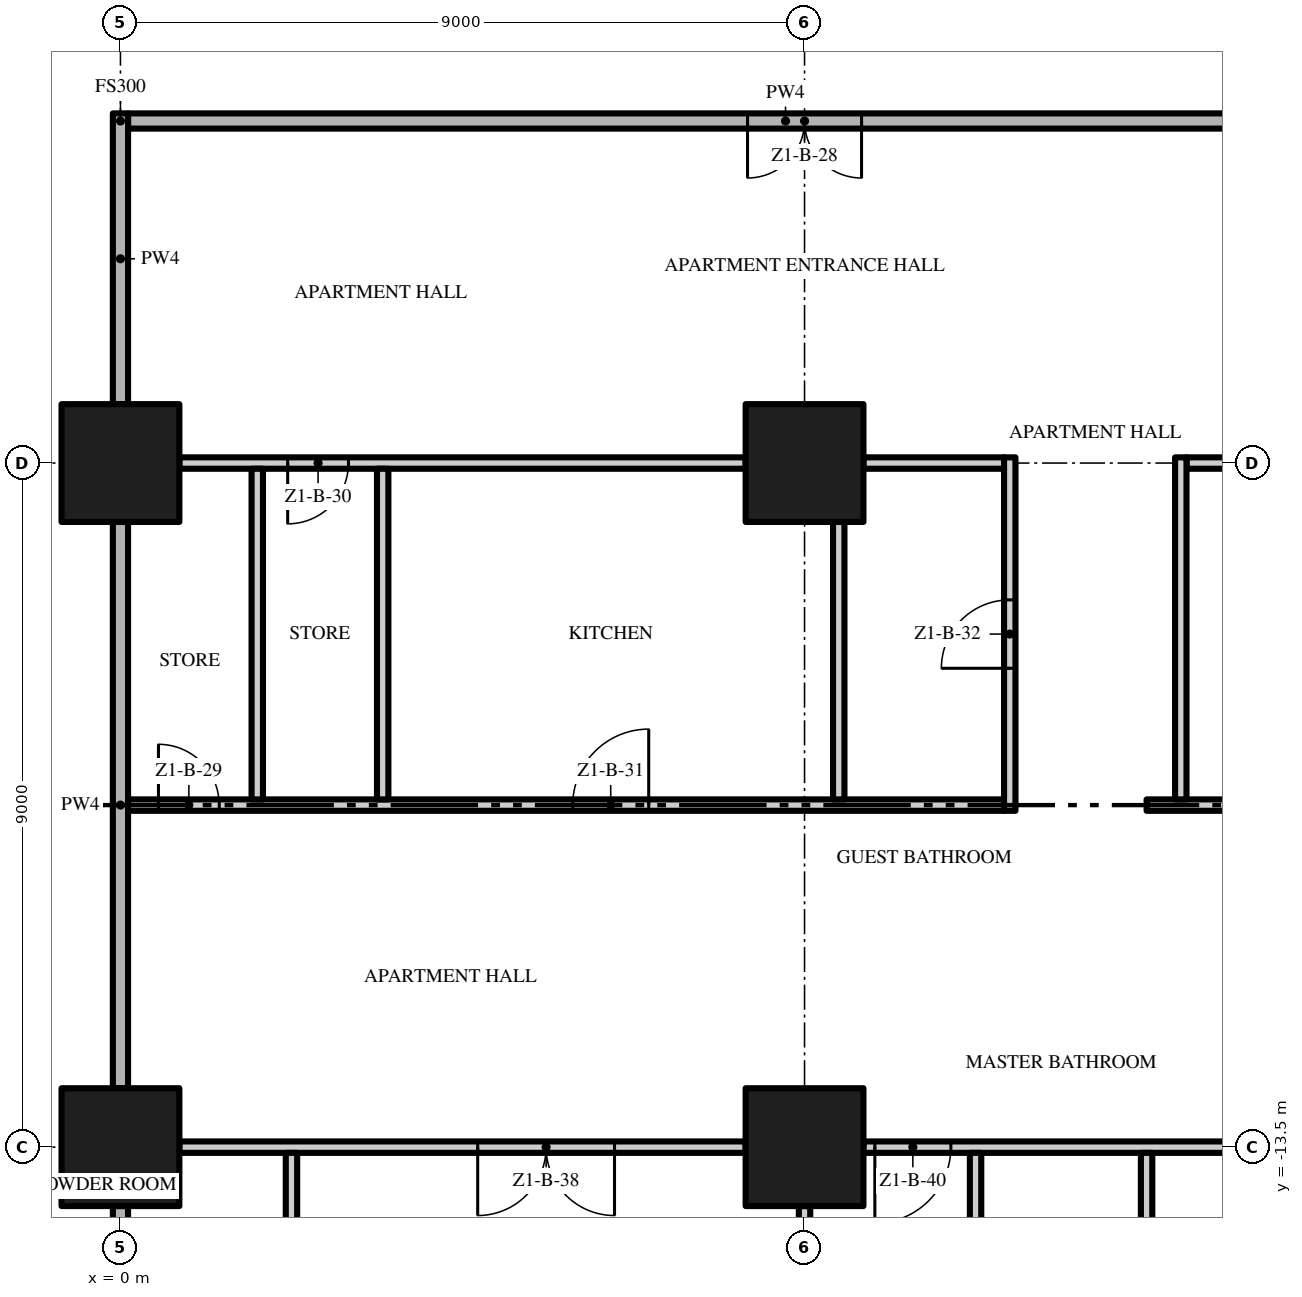
"""IFC4 building model, lengths in metres.
Left out: names, types, materials, properties, quantities, classifications, styles, units other than length and angle.
Written with IfcOpenShell. Run it as: python <this file> out.ifc"""

import sys

from ifc_helpers import new_model, si_unit, direction, frame, frame_2d, origin, origin_2d, place, context, subcontext, project, spatial, rectangle, extrude, element, fill, save


model = new_model("IFC4")
c1 = context("Model", 3, precision=1e-05, world=origin(), true_north=direction((0.0, 1.0)))
c2 = subcontext(c1, "Body", "Model", "MODEL_VIEW")
j1 = project(units=[si_unit("LENGTHUNIT", "METRE"), si_unit("PLANEANGLEUNIT", "RADIAN")], contexts=[c1])
p1 = place(None, origin())
s1 = spatial("IfcSite", under=j1, at=p1, CompositionType="ELEMENT")
p2 = place(p1, origin())
s2 = spatial("IfcBuilding", under=s1, at=p2, CompositionType="ELEMENT")
p3 = place(p2, frame((0.0, 0.0, 30.2)))
s3 = spatial("IfcBuildingStorey", under=s2, at=p3, CompositionType="ELEMENT", Elevation=30.2)
for number, where, z_axis, x_axis in (
    (1, (0.0, -13.5, 0.0), (0.0, 0.0, 1.0), (1.0, 0.0, 0.0)),
    (2, (0.0, -4.5, 0.0), (0.0, 0.0, 1.0), (1.0, 0.0, 0.0)),
    (3, (9.0, -13.5, 0.0), (0.0, 0.0, 1.0), (1.0, 0.0, 0.0)),
    (4, (9.0, -4.5, 0.0), (0.0, 0.0, 1.0), (1.0, 0.0, 0.0)),
):
    element("IfcColumn", number, at=place(p3, frame(where, z_axis=z_axis, x_axis=x_axis)), inside=s3, PredefinedType="COLUMN", context=c2, shape_type="SweptSolid", body=[
        extrude(rectangle(XDim=1.55, YDim=1.55, at=origin_2d()), origin(), (0.0, 0.0, 1.0), 3.5),
    ])
p4 = place(p3, frame((8.225, -13.5, 0.0), z_axis=(0.0, 0.0, 1.0), x_axis=(-1.0, 0.0, 0.0)))
e5 = element("IfcWall", 5, at=p4, inside=s3, PredefinedType="PARTITIONING", context=c2, shape_type="SweptSolid", body=[
    extrude(rectangle(XDim=7.45, YDim=0.15, at=frame_2d((3.725, 0.0))), origin(), (0.0, 0.0, 1.0), 3.5),
])
p5 = place(p4, frame((1.725, 0.0, 0.0)))
e6 = element("IfcOpeningElement", 6, at=p5, cuts=e5, PredefinedType="OPENING", context=c2, shape_type="SweptSolid", body=[
    extrude(rectangle(XDim=1.8, YDim=2.4, at=frame_2d((0.9, 1.2))), frame((0.0, 0.085, 0.0), z_axis=(0.0, -1.0, 0.0), x_axis=(1.0, 0.0, 0.0)), (0.0, 0.0, 1.0), 0.17),
])
p6 = place(p3, frame((17.225, -13.5, 0.0), z_axis=(0.0, 0.0, 1.0), x_axis=(-1.0, 0.0, 0.0)))
e7 = element("IfcWall", 7, at=p6, inside=s3, PredefinedType="PARTITIONING", context=c2, shape_type="SweptSolid", body=[
    extrude(rectangle(XDim=7.45, YDim=0.15, at=frame_2d((3.725, 0.0))), origin(), (0.0, 0.0, 1.0), 3.5),
])
p7 = place(p6, frame((6.3, 0.0, 0.0)))
e8 = element("IfcOpeningElement", 8, at=p7, cuts=e7, PredefinedType="OPENING", context=c2, shape_type="SweptSolid", body=[
    extrude(rectangle(XDim=1.0, YDim=2.4, at=frame_2d((0.5, 1.2))), frame((0.0, 0.085, 0.0), z_axis=(0.0, -1.0, 0.0), x_axis=(1.0, 0.0, 0.0)), (0.0, 0.0, 1.0), 0.17),
])
p8 = place(p6, frame((0.15, 0.0, 0.0)))
e9 = element("IfcOpeningElement", 9, at=p8, cuts=e7, PredefinedType="OPENING", context=c2, shape_type="SweptSolid", body=[
    extrude(rectangle(XDim=1.0, YDim=2.4, at=frame_2d((0.5, 1.2))), frame((0.0, 0.085, 0.0), z_axis=(0.0, -1.0, 0.0), x_axis=(1.0, 0.0, 0.0)), (0.0, 0.0, 1.0), 0.17),
])
p9 = place(p3, frame((0.1, -9.0, 0.0), z_axis=(0.0, 0.0, 1.0), x_axis=(1.0, 0.0, 0.0)))
e10 = element("IfcWall", 10, at=p9, inside=s3, PredefinedType="PARTITIONING", context=c2, shape_type="SweptSolid", body=[
    extrude(rectangle(XDim=11.525, YDim=0.15, at=frame_2d((5.763, 0.0))), origin(), (0.0, 0.0, 1.0), 3.5),
])
p10 = place(p9, frame((0.4, 0.0, 0.0)))
e11 = element("IfcOpeningElement", 11, at=p10, cuts=e10, PredefinedType="OPENING", context=c2, shape_type="SweptSolid", body=[
    extrude(rectangle(XDim=0.8, YDim=2.0, at=frame_2d((0.4, 1.0))), frame((0.0, 0.085, 0.0), z_axis=(0.0, -1.0, 0.0), x_axis=(1.0, 0.0, 0.0)), (0.0, 0.0, 1.0), 0.17),
])
p11 = place(p9, frame((5.85, 0.0, 0.0)))
e12 = element("IfcOpeningElement", 12, at=p11, cuts=e10, PredefinedType="OPENING", context=c2, shape_type="SweptSolid", body=[
    extrude(rectangle(XDim=1.0, YDim=2.4, at=frame_2d((0.5, 1.2))), frame((0.0, 0.085, 0.0), z_axis=(0.0, -1.0, 0.0), x_axis=(1.0, 0.0, 0.0)), (0.0, 0.0, 1.0), 0.17),
])
p12 = place(p3, frame((13.5, -9.0, 0.0), z_axis=(0.0, 0.0, 1.0), x_axis=(1.0, 0.0, 0.0)))
e13 = element("IfcWall", 13, at=p12, inside=s3, PredefinedType="PARTITIONING", context=c2, shape_type="SweptSolid", body=[
    extrude(rectangle(XDim=13.2, YDim=0.15, at=frame_2d((6.6, 0.0))), origin(), (0.0, 0.0, 1.0), 3.5),
])
p13 = place(p12, frame((4.0, 0.0, 0.0)))
e14 = element("IfcOpeningElement", 14, at=p13, cuts=e13, PredefinedType="OPENING", context=c2, shape_type="SweptSolid", body=[
    extrude(rectangle(XDim=0.8, YDim=2.0, at=frame_2d((0.4, 1.0))), frame((0.0, 0.085, 0.0), z_axis=(0.0, -1.0, 0.0), x_axis=(1.0, 0.0, 0.0)), (0.0, 0.0, 1.0), 0.17),
])
p14 = place(p12, frame((12.2, 0.0, 0.0)))
e15 = element("IfcOpeningElement", 15, at=p14, cuts=e13, PredefinedType="OPENING", context=c2, shape_type="SweptSolid", body=[
    extrude(rectangle(XDim=0.8, YDim=2.0, at=frame_2d((0.4, 1.0))), frame((0.0, 0.085, 0.0), z_axis=(0.0, -1.0, 0.0), x_axis=(1.0, 0.0, 0.0)), (0.0, 0.0, 1.0), 0.17),
])
p15 = place(p3, frame((8.225, -4.5, 0.0), z_axis=(0.0, 0.0, 1.0), x_axis=(-1.0, 0.0, 0.0)))
e16 = element("IfcWall", 16, at=p15, inside=s3, PredefinedType="PARTITIONING", context=c2, shape_type="SweptSolid", body=[
    extrude(rectangle(XDim=7.45, YDim=0.15, at=frame_2d((3.725, 0.0))), origin(), (0.0, 0.0, 1.0), 3.5),
])
p16 = place(p15, frame((5.225, 0.0, 0.0)))
e17 = element("IfcOpeningElement", 17, at=p16, cuts=e16, PredefinedType="OPENING", context=c2, shape_type="SweptSolid", body=[
    extrude(rectangle(XDim=0.8, YDim=2.0, at=frame_2d((0.4, 1.0))), frame((0.0, 0.085, 0.0), z_axis=(0.0, -1.0, 0.0), x_axis=(1.0, 0.0, 0.0)), (0.0, 0.0, 1.0), 0.17),
])
p17 = place(p3, frame((9.775, -4.5, 0.0), z_axis=(0.0, 0.0, 1.0), x_axis=(1.0, 0.0, 0.0)))
e18 = element("IfcWall", 18, at=p17, inside=s3, PredefinedType="PARTITIONING", context=c2, shape_type="SweptSolid", body=[
    extrude(rectangle(XDim=1.85, YDim=0.15, at=frame_2d((0.925, 0.0))), origin(), (0.0, 0.0, 1.0), 3.5),
])
p18 = place(p3, frame((17.225, -4.5, 0.0), z_axis=(0.0, 0.0, 1.0), x_axis=(-1.0, 0.0, 0.0)))
e19 = element("IfcWall", 19, at=p18, inside=s3, PredefinedType="PARTITIONING", context=c2, shape_type="SweptSolid", body=[
    extrude(rectangle(XDim=3.2, YDim=0.15, at=frame_2d((1.6, 0.0))), origin(), (0.0, 0.0, 1.0), 3.5),
])
p19 = place(p18, frame((1.55, 0.0, 0.0)))
e20 = element("IfcOpeningElement", 20, at=p19, cuts=e19, PredefinedType="OPENING", context=c2, shape_type="SweptSolid", body=[
    extrude(rectangle(XDim=0.8, YDim=2.0, at=frame_2d((0.4, 1.0))), frame((0.0, 0.085, 0.0), z_axis=(0.0, -1.0, 0.0), x_axis=(1.0, 0.0, 0.0)), (0.0, 0.0, 1.0), 0.17),
])
p20 = place(p3, frame((17.4, 0.0, 0.0), z_axis=(0.0, 0.0, 1.0), x_axis=(-1.0, 0.0, 0.0)))
e21 = element("IfcWall", 21, at=p20, inside=s3, PredefinedType="PARTITIONING", context=c2, shape_type="SweptSolid", body=[
    extrude(rectangle(XDim=17.3, YDim=0.2, at=frame_2d((8.65, 0.0))), origin(), (0.0, 0.0, 1.0), 3.5),
])
p21 = place(p20, frame((7.65, 0.0, 0.0)))
e22 = element("IfcOpeningElement", 22, at=p21, cuts=e21, PredefinedType="OPENING", context=c2, shape_type="SweptSolid", body=[
    extrude(rectangle(XDim=1.5, YDim=2.4, at=frame_2d((0.75, 1.2))), frame((0.0, 0.11, 0.0), z_axis=(0.0, -1.0, 0.0), x_axis=(1.0, 0.0, 0.0)), (0.0, 0.0, 1.0), 0.22),
])
p22 = place(p3, frame((0.0, -21.05, 0.0), z_axis=(0.0, 0.0, 1.0), x_axis=(0.0, 1.0, 0.0)))
e23 = element("IfcWall", 23, at=p22, inside=s3, PredefinedType="PARTITIONING", context=c2, shape_type="SweptSolid", body=[
    extrude(rectangle(XDim=6.775, YDim=0.2, at=frame_2d((3.388, 0.0))), origin(), (0.0, 0.0, 1.0), 3.5),
])
p23 = place(p3, frame((0.0, -12.725, 0.0), z_axis=(0.0, 0.0, 1.0), x_axis=(0.0, 1.0, 0.0)))
e24 = element("IfcWall", 24, at=p23, inside=s3, PredefinedType="PARTITIONING", context=c2, shape_type="SweptSolid", body=[
    extrude(rectangle(XDim=7.45, YDim=0.2, at=frame_2d((3.725, 0.0))), origin(), (0.0, 0.0, 1.0), 3.5),
])
p24 = place(p3, frame((0.0, -3.725, 0.0), z_axis=(0.0, 0.0, 1.0), x_axis=(0.0, 1.0, 0.0)))
e25 = element("IfcWall", 25, at=p24, inside=s3, PredefinedType="PARTITIONING", context=c2, shape_type="SweptSolid", body=[
    extrude(rectangle(XDim=3.825, YDim=0.2, at=frame_2d((1.913, 0.0))), origin(), (0.0, 0.0, 1.0), 3.5),
])
p25 = place(p3, frame((1.8, -8.925, 0.0), z_axis=(0.0, 0.0, 1.0), x_axis=(0.0, 1.0, 0.0)))
e26 = element("IfcWall", 26, at=p25, inside=s3, PredefinedType="PARTITIONING", context=c2, shape_type="SweptSolid", body=[
    extrude(rectangle(XDim=4.35, YDim=0.15, at=frame_2d((2.175, 0.0))), origin(), (0.0, 0.0, 1.0), 3.5),
])
p26 = place(p3, frame((2.25, -16.575, 0.0), z_axis=(0.0, 0.0, 1.0), x_axis=(0.0, 1.0, 0.0)))
e27 = element("IfcWall", 27, at=p26, inside=s3, PredefinedType="PARTITIONING", context=c2, shape_type="SweptSolid", body=[
    extrude(rectangle(XDim=3.0, YDim=0.15, at=frame_2d((1.5, 0.0))), origin(), (0.0, 0.0, 1.0), 3.5),
])
p27 = place(p26, frame((1.125, 0.0, 0.0)))
e28 = element("IfcOpeningElement", 28, at=p27, cuts=e27, PredefinedType="OPENING", context=c2, shape_type="SweptSolid", body=[
    extrude(rectangle(XDim=0.9, YDim=2.1, at=frame_2d((0.45, 1.05))), frame((0.0, 0.085, 0.0), z_axis=(0.0, -1.0, 0.0), x_axis=(1.0, 0.0, 0.0)), (0.0, 0.0, 1.0), 0.17),
])
p28 = place(p3, frame((3.45, -8.925, 0.0), z_axis=(0.0, 0.0, 1.0), x_axis=(0.0, 1.0, 0.0)))
e29 = element("IfcWall", 29, at=p28, inside=s3, PredefinedType="PARTITIONING", context=c2, shape_type="SweptSolid", body=[
    extrude(rectangle(XDim=4.35, YDim=0.15, at=frame_2d((2.175, 0.0))), origin(), (0.0, 0.0, 1.0), 3.5),
])
p29 = place(p3, frame((9.0, -21.05, 0.0), z_axis=(0.0, 0.0, 1.0), x_axis=(0.0, 1.0, 0.0)))
e30 = element("IfcWall", 30, at=p29, inside=s3, PredefinedType="PARTITIONING", context=c2, shape_type="SweptSolid", body=[
    extrude(rectangle(XDim=6.775, YDim=0.15, at=frame_2d((3.388, 0.0))), origin(), (0.0, 0.0, 1.0), 3.5),
])
p30 = place(p3, frame((9.45, -8.925, 0.0), z_axis=(0.0, 0.0, 1.0), x_axis=(0.0, 1.0, 0.0)))
e31 = element("IfcWall", 31, at=p30, inside=s3, PredefinedType="PARTITIONING", context=c2, shape_type="SweptSolid", body=[
    extrude(rectangle(XDim=3.65, YDim=0.15, at=frame_2d((1.825, 0.0))), origin(), (0.0, 0.0, 1.0), 3.5),
])
p31 = place(p3, frame((11.25, -16.575, 0.0), z_axis=(0.0, 0.0, 1.0), x_axis=(0.0, 1.0, 0.0)))
e32 = element("IfcWall", 32, at=p31, inside=s3, PredefinedType="PARTITIONING", context=c2, shape_type="SweptSolid", body=[
    extrude(rectangle(XDim=3.0, YDim=0.15, at=frame_2d((1.5, 0.0))), origin(), (0.0, 0.0, 1.0), 3.5),
])
p32 = place(p3, frame((11.7, -9.075, 0.0), z_axis=(0.0, 0.0, 1.0), x_axis=(0.0, 1.0, 0.0)))
e33 = element("IfcWall", 33, at=p32, inside=s3, PredefinedType="PARTITIONING", context=c2, shape_type="SweptSolid", body=[
    extrude(rectangle(XDim=4.65, YDim=0.15, at=frame_2d((2.325, 0.0))), origin(), (0.0, 0.0, 1.0), 3.5),
])
p33 = place(p32, frame((1.875, 0.0, 0.0)))
e34 = element("IfcOpeningElement", 34, at=p33, cuts=e33, PredefinedType="OPENING", context=c2, shape_type="SweptSolid", body=[
    extrude(rectangle(XDim=0.9, YDim=2.1, at=frame_2d((0.45, 1.05))), frame((0.0, 0.085, 0.0), z_axis=(0.0, -1.0, 0.0), x_axis=(1.0, 0.0, 0.0)), (0.0, 0.0, 1.0), 0.17),
])
p34 = place(p3, frame((13.5, -22.2, 0.0), z_axis=(0.0, 0.0, 1.0), x_axis=(0.0, 1.0, 0.0)))
e35 = element("IfcWall", 35, at=p34, inside=s3, PredefinedType="PARTITIONING", context=c2, shape_type="SweptSolid", body=[
    extrude(rectangle(XDim=8.625, YDim=0.15, at=frame_2d((4.312, 0.0))), origin(), (0.0, 0.0, 1.0), 3.5),
])
p35 = place(p3, frame((13.95, -8.925, 0.0), z_axis=(0.0, 0.0, 1.0), x_axis=(0.0, 1.0, 0.0)))
e36 = element("IfcWall", 36, at=p35, inside=s3, PredefinedType="PARTITIONING", context=c2, shape_type="SweptSolid", body=[
    extrude(rectangle(XDim=4.5, YDim=0.15, at=frame_2d((2.25, 0.0))), origin(), (0.0, 0.0, 1.0), 3.5),
])
p36 = place(p21, origin())
e37 = element("IfcDoor", 37, at=p36, inside=s3, OperationType="DOUBLE_DOOR_SINGLE_SWING", PredefinedType="DOOR", context=c2, shape_type="SweptSolid", body=[
    extrude(rectangle(XDim=1.5, YDim=2.4, at=frame_2d((0.75, 1.2))), frame((0.0, 0.025, 0.0), z_axis=(0.0, -1.0, 0.0), x_axis=(1.0, 0.0, 0.0)), (0.0, 0.0, 1.0), 0.05),
])
fill(e22, e37)
p37 = place(p10, origin())
e38 = element("IfcDoor", 38, at=p37, inside=s3, OperationType="SINGLE_SWING_LEFT", PredefinedType="DOOR", context=c2, shape_type="SweptSolid", body=[
    extrude(rectangle(XDim=0.8, YDim=2.0, at=frame_2d((0.4, 1.0))), frame((0.0, 0.025, 0.0), z_axis=(0.0, -1.0, 0.0), x_axis=(1.0, 0.0, 0.0)), (0.0, 0.0, 1.0), 0.05),
])
fill(e11, e38)
p38 = place(p16, origin())
e39 = element("IfcDoor", 39, at=p38, inside=s3, OperationType="SINGLE_SWING_RIGHT", PredefinedType="DOOR", context=c2, shape_type="SweptSolid", body=[
    extrude(rectangle(XDim=0.8, YDim=2.0, at=frame_2d((0.4, 1.0))), frame((0.0, 0.025, 0.0), z_axis=(0.0, -1.0, 0.0), x_axis=(1.0, 0.0, 0.0)), (0.0, 0.0, 1.0), 0.05),
])
fill(e17, e39)
p39 = place(p11, origin())
e40 = element("IfcDoor", 40, at=p39, inside=s3, OperationType="SINGLE_SWING_RIGHT", PredefinedType="DOOR", context=c2, shape_type="SweptSolid", body=[
    extrude(rectangle(XDim=1.0, YDim=2.4, at=frame_2d((0.5, 1.2))), frame((0.0, 0.025, 0.0), z_axis=(0.0, -1.0, 0.0), x_axis=(1.0, 0.0, 0.0)), (0.0, 0.0, 1.0), 0.05),
])
fill(e12, e40)
p40 = place(p33, origin())
e41 = element("IfcDoor", 41, at=p40, inside=s3, OperationType="SINGLE_SWING_LEFT", PredefinedType="DOOR", context=c2, shape_type="SweptSolid", body=[
    extrude(rectangle(XDim=0.9, YDim=2.1, at=frame_2d((0.45, 1.05))), frame((0.0, 0.025, 0.0), z_axis=(0.0, -1.0, 0.0), x_axis=(1.0, 0.0, 0.0)), (0.0, 0.0, 1.0), 0.05),
])
fill(e34, e41)
p41 = place(p5, origin())
e42 = element("IfcDoor", 42, at=p41, inside=s3, OperationType="DOUBLE_DOOR_SINGLE_SWING", PredefinedType="DOOR", context=c2, shape_type="SweptSolid", body=[
    extrude(rectangle(XDim=1.8, YDim=2.4, at=frame_2d((0.9, 1.2))), frame((0.0, 0.025, 0.0), z_axis=(0.0, -1.0, 0.0), x_axis=(1.0, 0.0, 0.0)), (0.0, 0.0, 1.0), 0.05),
])
fill(e6, e42)
p42 = place(p7, origin())
e43 = element("IfcDoor", 43, at=p42, inside=s3, OperationType="SINGLE_SWING_RIGHT", PredefinedType="DOOR", context=c2, shape_type="SweptSolid", body=[
    extrude(rectangle(XDim=1.0, YDim=2.4, at=frame_2d((0.5, 1.2))), frame((0.0, 0.025, 0.0), z_axis=(0.0, -1.0, 0.0), x_axis=(1.0, 0.0, 0.0)), (0.0, 0.0, 1.0), 0.05),
])
fill(e8, e43)
save(model, sys.argv[1])
